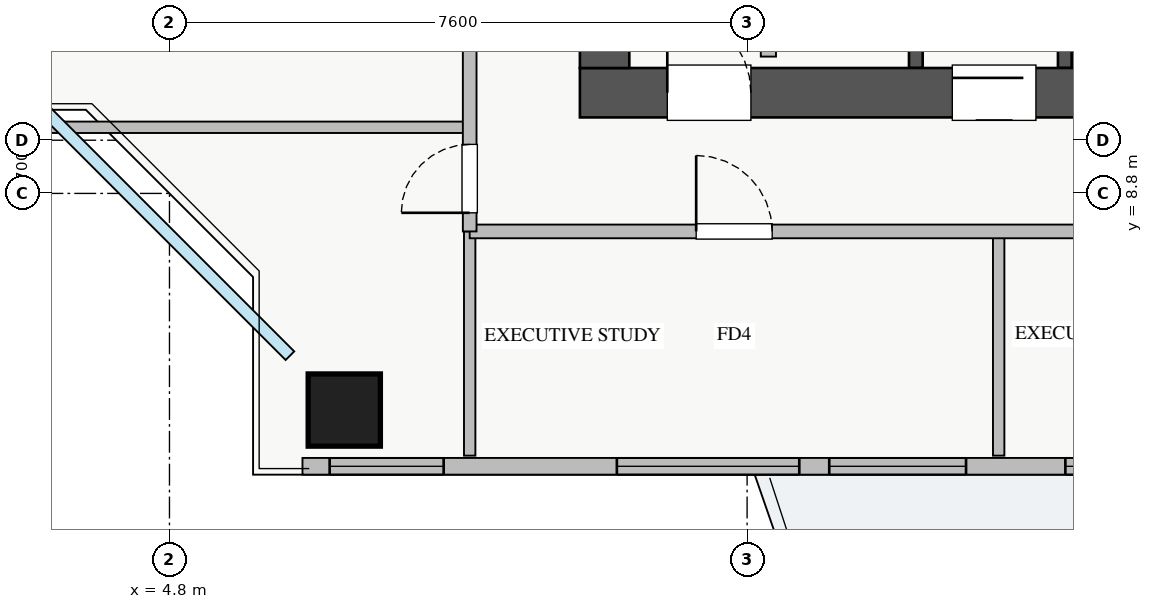
"""IFC4 building model, lengths in metres.
Left out: names, types, materials, properties, quantities, classifications, styles, units other than length and angle.
Written with IfcOpenShell. Run it as: python <this file> out.ifc"""

import sys

from ifc_helpers import new_model, si_unit, direction, frame, frame_2d, origin, origin_2d, place, context, subcontext, project, spatial, rectangle, extrude, source, transform, mapped, element, fill, save


model = new_model("IFC4")
c1 = context("Model", 3, precision=1e-05, world=origin(), true_north=direction((0.0, 1.0)))
c2 = subcontext(c1, "Body", "Model", "MODEL_VIEW")
j1 = project(units=[si_unit("LENGTHUNIT", "METRE"), si_unit("PLANEANGLEUNIT", "RADIAN")], contexts=[c1])
p1 = place(None, origin())
s1 = spatial("IfcSite", under=j1, at=p1, CompositionType="ELEMENT")
p2 = place(p1, origin())
s2 = spatial("IfcBuilding", under=s1, at=p2, CompositionType="ELEMENT")
p3 = place(p2, frame((0.0, 0.0, 143.75)))
s3 = spatial("IfcBuildingStorey", under=s2, at=p3, CompositionType="ELEMENT", Elevation=143.75)
for number, where, z_axis, x_axis in (
    (1, (14.62, 10.45, 0.0), (0.0, 0.0, 1.0), (0.0, 1.0, 0.0)),
    (2, (16.58, 10.45, 0.0), (0.0, 0.0, 1.0), (0.0, 1.0, 0.0)),
):
    element("IfcWall", number, at=place(p3, frame(where, z_axis=z_axis, x_axis=x_axis)), inside=s3, PredefinedType="SHEAR", context=c2, shape_type="SweptSolid", body=[
        extrude(rectangle(XDim=2.35, YDim=0.18, at=frame_2d((1.175, 0.0))), origin(), (0.0, 0.0, 1.0), 3.07),
    ])
p4 = place(p3, frame((10.2, 10.125, 0.0), z_axis=(0.0, 0.0, 1.0), x_axis=(1.0, 0.0, 0.0)))
e3 = element("IfcWall", 3, at=p4, inside=s3, PredefinedType="SHEAR", context=c2, shape_type="SweptSolid", body=[
    extrude(rectangle(XDim=17.6, YDim=0.65, at=frame_2d((8.8, 0.0))), origin(), (0.0, 0.0, 1.0), 3.25),
])
p5 = place(p4, frame((1.15, 0.0, 0.0)))
e4 = element("IfcOpeningElement", 4, at=p5, cuts=e3, PredefinedType="OPENING", context=c2, shape_type="SweptSolid", body=[
    extrude(rectangle(XDim=1.1, YDim=2.05, at=frame_2d((0.55, 1.025))), frame((0.0, 0.335, 0.0), z_axis=(0.0, -1.0, 0.0), x_axis=(1.0, 0.0, 0.0)), (0.0, 0.0, 1.0), 0.67),
])
p6 = place(p4, frame((8.3, 0.0, 0.0)))
e5 = element("IfcOpeningElement", 5, at=p6, cuts=e3, PredefinedType="OPENING", context=c2, shape_type="SweptSolid", body=[
    extrude(rectangle(XDim=1.1, YDim=2.05, at=frame_2d((0.55, 1.025))), frame((0.0, 0.335, 0.0), z_axis=(0.0, -1.0, 0.0), x_axis=(1.0, 0.0, 0.0)), (0.0, 0.0, 1.0), 0.67),
])
p7 = place(p4, frame((4.9, 0.0, 0.0)))
e6 = element("IfcOpeningElement", 6, at=p7, cuts=e3, PredefinedType="OPENING", context=c2, shape_type="SweptSolid", body=[
    extrude(rectangle(XDim=1.1, YDim=2.05, at=frame_2d((0.55, 1.025))), frame((0.0, 0.335, 0.0), z_axis=(0.0, -1.0, 0.0), x_axis=(1.0, 0.0, 0.0)), (0.0, 0.0, 1.0), 0.67),
])
p8 = place(p4, frame((14.74, 0.0, 0.0)))
e7 = element("IfcOpeningElement", 7, at=p8, cuts=e3, PredefinedType="OPENING", context=c2, shape_type="SweptSolid", body=[
    extrude(rectangle(XDim=1.0, YDim=2.05, at=frame_2d((0.5, 1.025))), frame((0.0, 0.335, 0.0), z_axis=(0.0, -1.0, 0.0), x_axis=(1.0, 0.0, 0.0)), (0.0, 0.0, 1.0), 0.67),
])
p9 = place(p4, frame((10.155, 0.0, 0.0)))
e8 = element("IfcOpeningElement", 8, at=p9, cuts=e3, PredefinedType="OPENING", context=c2, shape_type="SweptSolid", body=[
    extrude(rectangle(XDim=1.0, YDim=2.05, at=frame_2d((0.5, 1.025))), frame((0.0, 0.335, 0.0), z_axis=(0.0, -1.0, 0.0), x_axis=(1.0, 0.0, 0.0)), (0.0, 0.0, 1.0), 0.67),
])
p10 = place(p4, frame((11.87, 0.0, 0.0)))
e9 = element("IfcOpeningElement", 9, at=p10, cuts=e3, PredefinedType="OPENING", context=c2, shape_type="SweptSolid", body=[
    extrude(rectangle(XDim=1.0, YDim=2.05, at=frame_2d((0.5, 1.025))), frame((0.0, 0.335, 0.0), z_axis=(0.0, -1.0, 0.0), x_axis=(1.0, 0.0, 0.0)), (0.0, 0.0, 1.0), 0.67),
])
p11 = place(p4, frame((13.46, 0.0, 0.0)))
e10 = element("IfcOpeningElement", 10, at=p11, cuts=e3, PredefinedType="OPENING", context=c2, shape_type="SweptSolid", body=[
    extrude(rectangle(XDim=1.0, YDim=2.05, at=frame_2d((0.5, 1.025))), frame((0.0, 0.335, 0.0), z_axis=(0.0, -1.0, 0.0), x_axis=(1.0, 0.0, 0.0)), (0.0, 0.0, 1.0), 0.67),
])
p12 = place(p3, frame((10.525, 10.45, 0.0), z_axis=(0.0, 0.0, 1.0), x_axis=(0.0, 1.0, 0.0)))
e11 = element("IfcWall", 11, at=p12, inside=s3, PredefinedType="SHEAR", context=c2, shape_type="SweptSolid", body=[
    extrude(rectangle(XDim=5.9, YDim=0.65, at=frame_2d((2.95, 0.0))), origin(), (0.0, 0.0, 1.0), 3.25),
])
m1 = source(origin(), c2, "Body", "SweptSolid", [
    extrude(rectangle(XDim=0.95, YDim=0.95, at=origin_2d()), origin(), (0.0, 0.0, 1.0), 3.25),
])
p13 = place(p3, frame((7.1, 5.95, 0.0), z_axis=(0.0, 0.0, 1.0), x_axis=(1.0, 0.0, 0.0)))
e12 = element("IfcColumn", 12, at=p13, inside=s3, PredefinedType="COLUMN", context=c2, shape_type="MappedRepresentation", body=[
    mapped(m1, transform((0.0, 0.0, 0.0), x_axis=(1.0, 0.0, 0.0), y_axis=(0.0, 1.0, 0.0), z_axis=(0.0, 0.0, 1.0), scale=1.0)),
])
p14 = place(p3, frame((6.55, 5.21, 0.0), z_axis=(0.0, 0.0, 1.0), x_axis=(1.0, 0.0, 0.0)))
e13 = element("IfcWall", 13, at=p14, inside=s3, PredefinedType="STANDARD", context=c2, shape_type="SweptSolid", body=[
    extrude(rectangle(XDim=24.9, YDim=0.22, at=frame_2d((12.45, 0.0))), origin(), (0.0, 0.0, 1.0), 2.61),
])
p15 = place(p14, frame((13.3, 0.0, 0.0)))
e14 = element("IfcOpeningElement", 14, at=p15, cuts=e13, PredefinedType="OPENING", context=c2, shape_type="SweptSolid", body=[
    extrude(rectangle(XDim=1.2, YDim=2.1, at=frame_2d((0.6, 1.05))), frame((0.0, 0.12, 0.0), z_axis=(0.0, -1.0, 0.0), x_axis=(1.0, 0.0, 0.0)), (0.0, 0.0, 1.0), 0.24),
])
p16 = place(p14, frame((0.357, 0.0, 0.9)))
e15 = element("IfcOpeningElement", 15, at=p16, cuts=e13, PredefinedType="OPENING", context=c2, shape_type="SweptSolid", body=[
    extrude(rectangle(XDim=1.5, YDim=1.5, at=frame_2d((0.75, 0.75))), frame((0.0, 0.12, 0.0), z_axis=(0.0, -1.0, 0.0), x_axis=(1.0, 0.0, 0.0)), (0.0, 0.0, 1.0), 0.24),
])
p17 = place(p14, frame((6.931, 0.0, 0.9)))
e16 = element("IfcOpeningElement", 16, at=p17, cuts=e13, PredefinedType="OPENING", context=c2, shape_type="SweptSolid", body=[
    extrude(rectangle(XDim=1.8, YDim=1.5, at=frame_2d((0.9, 0.75))), frame((0.0, 0.12, 0.0), z_axis=(0.0, -1.0, 0.0), x_axis=(1.0, 0.0, 0.0)), (0.0, 0.0, 1.0), 0.24),
])
p18 = place(p14, frame((14.813, 0.0, 0.9)))
e17 = element("IfcOpeningElement", 17, at=p18, cuts=e13, PredefinedType="OPENING", context=c2, shape_type="SweptSolid", body=[
    extrude(rectangle(XDim=1.5, YDim=1.45, at=frame_2d((0.75, 0.725))), frame((0.0, 0.12, 0.0), z_axis=(0.0, -1.0, 0.0), x_axis=(1.0, 0.0, 0.0)), (0.0, 0.0, 1.0), 0.24),
])
p19 = place(p14, frame((20.738, 0.0, 0.9)))
e18 = element("IfcOpeningElement", 18, at=p19, cuts=e13, PredefinedType="OPENING", context=c2, shape_type="SweptSolid", body=[
    extrude(rectangle(XDim=2.1, YDim=1.48, at=frame_2d((1.05, 0.74))), frame((0.0, 0.12, 0.0), z_axis=(0.0, -1.0, 0.0), x_axis=(1.0, 0.0, 0.0)), (0.0, 0.0, 1.0), 0.24),
])
p20 = place(p14, frame((4.136, 0.0, 0.9)))
e19 = element("IfcOpeningElement", 19, at=p20, cuts=e13, PredefinedType="OPENING", context=c2, shape_type="SweptSolid", body=[
    extrude(rectangle(XDim=2.4, YDim=1.5, at=frame_2d((1.2, 0.75))), frame((0.0, 0.12, 0.0), z_axis=(0.0, -1.0, 0.0), x_axis=(1.0, 0.0, 0.0)), (0.0, 0.0, 1.0), 0.24),
])
p21 = place(p14, frame((10.038, 0.0, 0.9)))
e20 = element("IfcOpeningElement", 20, at=p21, cuts=e13, PredefinedType="OPENING", context=c2, shape_type="SweptSolid", body=[
    extrude(rectangle(XDim=2.4, YDim=1.5, at=frame_2d((1.2, 0.75))), frame((0.0, 0.12, 0.0), z_axis=(0.0, -1.0, 0.0), x_axis=(1.0, 0.0, 0.0)), (0.0, 0.0, 1.0), 0.24),
])
p22 = place(p3, frame((12.68, 10.6, 0.0), z_axis=(0.0, 0.0, 1.0), x_axis=(0.0, 1.0, 0.0)))
e21 = element("IfcWall", 21, at=p22, inside=s3, PredefinedType="PARTITIONING", context=c2, shape_type="SweptSolid", body=[
    extrude(rectangle(XDim=2.21, YDim=0.2, at=frame_2d((1.105, 0.0))), origin(), (0.0, 0.0, 1.0), 3.07),
])
p23 = place(p3, frame((15.71, 5.35, 0.0), z_axis=(0.0, 0.0, 1.0), x_axis=(0.0, 1.0, 0.0)))
e22 = element("IfcWall", 22, at=p23, inside=s3, PredefinedType="PARTITIONING", context=c2, shape_type="SweptSolid", body=[
    extrude(rectangle(XDim=2.95, YDim=0.15, at=frame_2d((1.475, 0.0))), origin(), (0.0, 0.0, 1.0), 2.865),
])
p24 = place(p3, frame((8.75, 5.35, 0.0), z_axis=(0.0, 0.0, 1.0), x_axis=(0.0, 1.0, 0.0)))
e23 = element("IfcWall", 23, at=p24, inside=s3, PredefinedType="PARTITIONING", context=c2, shape_type="SweptSolid", body=[
    extrude(rectangle(XDim=2.95, YDim=0.15, at=frame_2d((1.475, 0.0))), origin(), (0.0, 0.0, 1.0), 3.07),
])
p25 = place(p3, frame((8.75, 8.3, 0.0), z_axis=(0.0, 0.0, 1.0), x_axis=(1.0, 0.0, 0.0)))
e24 = element("IfcWall", 24, at=p25, inside=s3, PredefinedType="PARTITIONING", context=c2, shape_type="SweptSolid", body=[
    extrude(rectangle(XDim=23.61, YDim=0.18, at=frame_2d((11.805, 0.0))), origin(), (0.0, 0.0, 1.0), 3.07),
])
p26 = place(p25, frame((2.98, 0.0, 0.0)))
e25 = element("IfcOpeningElement", 25, at=p26, cuts=e24, PredefinedType="OPENING", context=c2, shape_type="SweptSolid", body=[
    extrude(rectangle(XDim=1.0, YDim=2.05, at=frame_2d((0.5, 1.025))), frame((0.0, 0.1, 0.0), z_axis=(0.0, -1.0, 0.0), x_axis=(1.0, 0.0, 0.0)), (0.0, 0.0, 1.0), 0.2),
])
p27 = place(p25, frame((10.725, 0.0, 0.0)))
e26 = element("IfcOpeningElement", 26, at=p27, cuts=e24, PredefinedType="OPENING", context=c2, shape_type="SweptSolid", body=[
    extrude(rectangle(XDim=1.0, YDim=2.05, at=frame_2d((0.5, 1.025))), frame((0.0, 0.1, 0.0), z_axis=(0.0, -1.0, 0.0), x_axis=(1.0, 0.0, 0.0)), (0.0, 0.0, 1.0), 0.2),
])
p28 = place(p25, frame((18.86, 0.0, 0.0)))
e27 = element("IfcOpeningElement", 27, at=p28, cuts=e24, PredefinedType="OPENING", context=c2, shape_type="SweptSolid", body=[
    extrude(rectangle(XDim=1.0, YDim=2.05, at=frame_2d((0.5, 1.025))), frame((0.0, 0.1, 0.0), z_axis=(0.0, -1.0, 0.0), x_axis=(1.0, 0.0, 0.0)), (0.0, 0.0, 1.0), 0.2),
])
p29 = place(p3, frame((1.35, 9.67, 0.0), z_axis=(0.0, 0.0, 1.0), x_axis=(1.0, 0.0, 0.0)))
e28 = element("IfcWall", 28, at=p29, inside=s3, PredefinedType="PARTITIONING", context=c2, shape_type="SweptSolid", body=[
    extrude(rectangle(XDim=7.4, YDim=0.15, at=frame_2d((3.7, 0.0))), origin(), (0.0, 0.0, 1.0), 3.07),
])
p30 = place(p3, frame((8.75, 8.3, 0.0), z_axis=(0.0, 0.0, 1.0), x_axis=(0.0, 1.0, 0.0)))
e29 = element("IfcWall", 29, at=p30, inside=s3, PredefinedType="PARTITIONING", context=c2, shape_type="SweptSolid", body=[
    extrude(rectangle(XDim=29.4, YDim=0.18, at=frame_2d((14.7, 0.0))), origin(), (0.0, 0.0, 1.0), 3.07),
])
p31 = place(p30, frame((28.08, 0.0, 0.0)))
e30 = element("IfcOpeningElement", 30, at=p31, cuts=e29, PredefinedType="OPENING", context=c2, shape_type="SweptSolid", body=[
    extrude(rectangle(XDim=0.9, YDim=2.05, at=frame_2d((0.45, 1.025))), frame((0.0, 0.1, 0.0), z_axis=(0.0, -1.0, 0.0), x_axis=(1.0, 0.0, 0.0)), (0.0, 0.0, 1.0), 0.2),
])
p32 = place(p30, frame((0.245, 0.0, 0.0)))
e31 = element("IfcOpeningElement", 31, at=p32, cuts=e29, PredefinedType="OPENING", context=c2, shape_type="SweptSolid", body=[
    extrude(rectangle(XDim=0.9, YDim=2.05, at=frame_2d((0.45, 1.025))), frame((0.0, 0.1, 0.0), z_axis=(0.0, -1.0, 0.0), x_axis=(1.0, 0.0, 0.0)), (0.0, 0.0, 1.0), 0.2),
])
p33 = place(p30, frame((5.0, 0.0, 0.0)))
e32 = element("IfcOpeningElement", 32, at=p33, cuts=e29, PredefinedType="OPENING", context=c2, shape_type="SweptSolid", body=[
    extrude(rectangle(XDim=1.0, YDim=2.05, at=frame_2d((0.5, 1.025))), frame((0.0, 0.1, 0.0), z_axis=(0.0, -1.0, 0.0), x_axis=(1.0, 0.0, 0.0)), (0.0, 0.0, 1.0), 0.2),
])
p34 = place(p30, frame((11.165, 0.0, 0.0)))
e33 = element("IfcOpeningElement", 33, at=p34, cuts=e29, PredefinedType="OPENING", context=c2, shape_type="SweptSolid", body=[
    extrude(rectangle(XDim=1.0, YDim=2.05, at=frame_2d((0.5, 1.025))), frame((0.0, 0.1, 0.0), z_axis=(0.0, -1.0, 0.0), x_axis=(1.0, 0.0, 0.0)), (0.0, 0.0, 1.0), 0.2),
])
p35 = place(p30, frame((20.325, 0.0, 0.0)))
e34 = element("IfcOpeningElement", 34, at=p35, cuts=e29, PredefinedType="OPENING", context=c2, shape_type="SweptSolid", body=[
    extrude(rectangle(XDim=1.0, YDim=2.05, at=frame_2d((0.5, 1.025))), frame((0.0, 0.1, 0.0), z_axis=(0.0, -1.0, 0.0), x_axis=(1.0, 0.0, 0.0)), (0.0, 0.0, 1.0), 0.2),
])
m2 = source(origin(), c2, "Body", "SweptSolid", [
    extrude(rectangle(XDim=1.5, YDim=1.5, at=frame_2d((0.75, 0.75))), frame((0.0, 0.03, 0.0), z_axis=(0.0, -1.0, 0.0), x_axis=(1.0, 0.0, 0.0)), (0.0, 0.0, 1.0), 0.06),
])
p36 = place(p16, origin())
e35 = element("IfcWindow", 35, at=p36, inside=s3, PartitioningType="TRIPLE_PANEL_VERTICAL", PredefinedType="WINDOW", context=c2, shape_type="MappedRepresentation", body=[
    mapped(m2, transform((0.0, 0.0, 0.0), x_axis=(1.0, 0.0, 0.0), y_axis=(0.0, 1.0, 0.0), z_axis=(0.0, 0.0, 1.0), scale=1.0)),
])
fill(e15, e35)
m3 = source(origin(), c2, "Body", "SweptSolid", [
    extrude(rectangle(XDim=1.8, YDim=1.5, at=frame_2d((0.9, 0.75))), frame((0.0, 0.03, 0.0), z_axis=(0.0, -1.0, 0.0), x_axis=(1.0, 0.0, 0.0)), (0.0, 0.0, 1.0), 0.06),
])
p37 = place(p17, origin())
e36 = element("IfcWindow", 36, at=p37, inside=s3, PartitioningType="DOUBLE_PANEL_VERTICAL", PredefinedType="WINDOW", context=c2, shape_type="MappedRepresentation", body=[
    mapped(m3, transform((0.0, 0.0, 0.0), x_axis=(1.0, 0.0, 0.0), y_axis=(0.0, 1.0, 0.0), z_axis=(0.0, 0.0, 1.0), scale=1.0)),
])
fill(e16, e36)
m4 = source(origin(), c2, "Body", "SweptSolid", [
    extrude(rectangle(XDim=1.1, YDim=2.05, at=frame_2d((0.55, 1.025))), frame((0.0, 0.025, 0.0), z_axis=(0.0, -1.0, 0.0), x_axis=(1.0, 0.0, 0.0)), (0.0, 0.0, 1.0), 0.05),
])
p38 = place(p5, origin())
e37 = element("IfcDoor", 37, at=p38, inside=s3, OperationType="SINGLE_SWING_LEFT", PredefinedType="DOOR", context=c2, shape_type="MappedRepresentation", body=[
    mapped(m4, transform((0.0, 0.0, 0.0), x_axis=(1.0, 0.0, 0.0), y_axis=(0.0, 1.0, 0.0), z_axis=(0.0, 0.0, 1.0), scale=1.0)),
])
fill(e4, e37)
p39 = place(p7, origin())
e38 = element("IfcDoor", 38, at=p39, inside=s3, OperationType="SLIDING_TO_RIGHT", PredefinedType="DOOR", context=c2, shape_type="MappedRepresentation", body=[
    mapped(m4, transform((0.0, 0.0, 0.0), x_axis=(1.0, 0.0, 0.0), y_axis=(0.0, 1.0, 0.0), z_axis=(0.0, 0.0, 1.0), scale=1.0)),
])
fill(e6, e38)
m5 = source(origin(), c2, "Body", "SweptSolid", [
    extrude(rectangle(XDim=1.0, YDim=2.05, at=frame_2d((0.5, 1.025))), frame((0.0, 0.025, 0.0), z_axis=(0.0, -1.0, 0.0), x_axis=(1.0, 0.0, 0.0)), (0.0, 0.0, 1.0), 0.05),
])
p40 = place(p26, origin())
e39 = element("IfcDoor", 39, at=p40, inside=s3, OperationType="SINGLE_SWING_LEFT", PredefinedType="DOOR", context=c2, shape_type="MappedRepresentation", body=[
    mapped(m5, transform((0.0, 0.0, 0.0), x_axis=(1.0, 0.0, 0.0), y_axis=(0.0, 1.0, 0.0), z_axis=(0.0, 0.0, 1.0), scale=1.0)),
])
fill(e25, e39)
m6 = source(origin(), c2, "Body", "SweptSolid", [
    extrude(rectangle(XDim=0.9, YDim=2.05, at=frame_2d((0.45, 1.025))), frame((0.0, 0.025, 0.0), z_axis=(0.0, -1.0, 0.0), x_axis=(1.0, 0.0, 0.0)), (0.0, 0.0, 1.0), 0.05),
])
p41 = place(p32, origin())
e40 = element("IfcDoor", 40, at=p41, inside=s3, OperationType="SINGLE_SWING_LEFT", PredefinedType="DOOR", context=c2, shape_type="MappedRepresentation", body=[
    mapped(m6, transform((0.0, 0.0, 0.0), x_axis=(1.0, 0.0, 0.0), y_axis=(0.0, 1.0, 0.0), z_axis=(0.0, 0.0, 1.0), scale=1.0)),
])
fill(e31, e40)
m7 = source(origin(), c2, "Body", "SweptSolid", [
    extrude(rectangle(XDim=2.4, YDim=1.5, at=frame_2d((1.2, 0.75))), frame((0.0, 0.03, 0.0), z_axis=(0.0, -1.0, 0.0), x_axis=(1.0, 0.0, 0.0)), (0.0, 0.0, 1.0), 0.06),
])
p42 = place(p20, origin())
e41 = element("IfcWindow", 41, at=p42, inside=s3, PartitioningType="TRIPLE_PANEL_VERTICAL", PredefinedType="WINDOW", context=c2, shape_type="MappedRepresentation", body=[
    mapped(m7, transform((0.0, 0.0, 0.0), x_axis=(1.0, 0.0, 0.0), y_axis=(0.0, 1.0, 0.0), z_axis=(0.0, 0.0, 1.0), scale=1.0)),
])
fill(e19, e41)
p43 = place(p21, origin())
e42 = element("IfcWindow", 42, at=p43, inside=s3, PartitioningType="TRIPLE_PANEL_VERTICAL", PredefinedType="WINDOW", context=c2, shape_type="MappedRepresentation", body=[
    mapped(m7, transform((0.0, 0.0, 0.0), x_axis=(1.0, 0.0, 0.0), y_axis=(0.0, 1.0, 0.0), z_axis=(0.0, 0.0, 1.0), scale=1.0)),
])
fill(e20, e42)
save(model, sys.argv[1])
